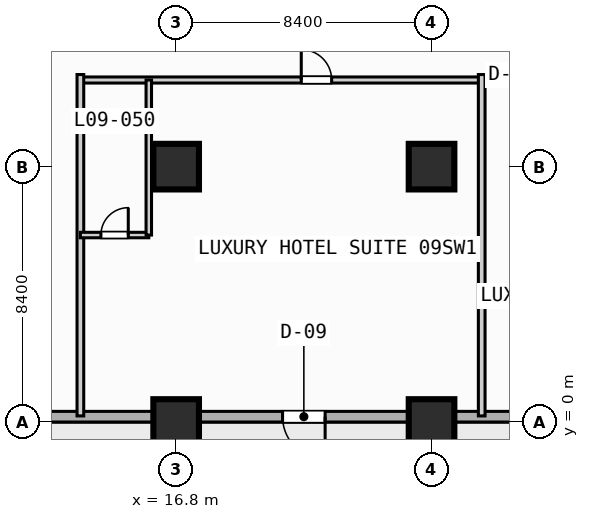
"""IFC4 building model, lengths in metres.
Left out: names, types, materials, properties, quantities, classifications, styles, units other than length and angle.
Written with IfcOpenShell. Run it as: python <this file> out.ifc"""

import sys

from ifc_helpers import new_model, si_unit, direction, frame, frame_2d, origin, origin_2d, place, context, subcontext, project, spatial, rectangle, extrude, element, fill, save


model = new_model("IFC4")
c1 = context("Model", 3, precision=1e-05, world=origin(), true_north=direction((0.0, 1.0)))
c2 = subcontext(c1, "Body", "Model", "MODEL_VIEW")
j1 = project(units=[si_unit("LENGTHUNIT", "METRE"), si_unit("PLANEANGLEUNIT", "RADIAN")], contexts=[c1])
p1 = place(None, origin())
s1 = spatial("IfcSite", under=j1, at=p1, CompositionType="ELEMENT")
p2 = place(p1, origin())
s2 = spatial("IfcBuilding", under=s1, at=p2, CompositionType="ELEMENT")
p3 = place(p2, frame((0.0, 0.0, 43.4)))
s3 = spatial("IfcBuildingStorey", under=s2, at=p3, CompositionType="ELEMENT", Elevation=43.4)
for number, where, z_axis, x_axis in (
    (1, (16.8, 0.0, 0.0), (0.0, 0.0, 1.0), (1.0, 0.0, 0.0)),
    (2, (16.8, 8.4, 0.0), (0.0, 0.0, 1.0), (1.0, 0.0, 0.0)),
    (3, (25.2, 0.0, 0.0), (0.0, 0.0, 1.0), (1.0, 0.0, 0.0)),
    (4, (25.2, 8.4, 0.0), (0.0, 0.0, 1.0), (1.0, 0.0, 0.0)),
):
    element("IfcColumn", number, at=place(p3, frame(where, z_axis=z_axis, x_axis=x_axis)), inside=s3, PredefinedType="COLUMN", context=c2, shape_type="SweptSolid", body=[
        extrude(rectangle(XDim=1.5, YDim=1.5, at=origin_2d()), origin(), (0.0, 0.0, 1.0), 3.8),
    ])
p4 = place(p3, frame((89.225, 0.175, 0.0), z_axis=(0.0, 0.0, 1.0), x_axis=(-1.0, 0.0, 0.0)))
e5 = element("IfcWall", 5, at=p4, inside=s3, PredefinedType="STANDARD", context=c2, shape_type="SweptSolid", body=[
    extrude(rectangle(XDim=86.05, YDim=0.35, at=frame_2d((43.025, 0.0))), origin(), (0.0, 0.0, 1.0), 3.55),
])
p5 = place(p4, frame((67.525, 0.0, 0.0)))
e6 = element("IfcOpeningElement", 6, at=p5, cuts=e5, PredefinedType="OPENING", context=c2, shape_type="SweptSolid", body=[
    extrude(rectangle(XDim=1.4, YDim=2.2, at=frame_2d((0.7, 1.1))), frame((0.0, 0.185, 0.0), z_axis=(0.0, -1.0, 0.0), x_axis=(1.0, 0.0, 0.0)), (0.0, 0.0, 1.0), 0.37),
])
p6 = place(p4, frame((58.725, 0.0, 0.85)))
e7 = element("IfcOpeningElement", 7, at=p6, cuts=e5, PredefinedType="OPENING", context=c2, shape_type="SweptSolid", body=[
    extrude(rectangle(XDim=2.2, YDim=1.8, at=frame_2d((1.1, 0.9))), frame((0.0, 0.185, 0.0), z_axis=(0.0, -1.0, 0.0), x_axis=(1.0, 0.0, 0.0)), (0.0, 0.0, 1.0), 0.37),
])
p7 = place(p4, frame((41.925, 0.0, 0.85)))
e8 = element("IfcOpeningElement", 8, at=p7, cuts=e5, PredefinedType="OPENING", context=c2, shape_type="SweptSolid", body=[
    extrude(rectangle(XDim=2.2, YDim=1.8, at=frame_2d((1.1, 0.9))), frame((0.0, 0.185, 0.0), z_axis=(0.0, -1.0, 0.0), x_axis=(1.0, 0.0, 0.0)), (0.0, 0.0, 1.0), 0.37),
])
p8 = place(p4, frame((33.525, 0.0, 0.85)))
e9 = element("IfcOpeningElement", 9, at=p8, cuts=e5, PredefinedType="OPENING", context=c2, shape_type="SweptSolid", body=[
    extrude(rectangle(XDim=2.2, YDim=1.8, at=frame_2d((1.1, 0.9))), frame((0.0, 0.185, 0.0), z_axis=(0.0, -1.0, 0.0), x_axis=(1.0, 0.0, 0.0)), (0.0, 0.0, 1.0), 0.37),
])
p9 = place(p4, frame((16.725, 0.0, 0.85)))
e10 = element("IfcOpeningElement", 10, at=p9, cuts=e5, PredefinedType="OPENING", context=c2, shape_type="SweptSolid", body=[
    extrude(rectangle(XDim=2.2, YDim=1.8, at=frame_2d((1.1, 0.9))), frame((0.0, 0.185, 0.0), z_axis=(0.0, -1.0, 0.0), x_axis=(1.0, 0.0, 0.0)), (0.0, 0.0, 1.0), 0.37),
])
p10 = place(p4, frame((8.325, 0.0, 0.85)))
e11 = element("IfcOpeningElement", 11, at=p10, cuts=e5, PredefinedType="OPENING", context=c2, shape_type="SweptSolid", body=[
    extrude(rectangle(XDim=2.2, YDim=1.8, at=frame_2d((1.1, 0.9))), frame((0.0, 0.185, 0.0), z_axis=(0.0, -1.0, 0.0), x_axis=(1.0, 0.0, 0.0)), (0.0, 0.0, 1.0), 0.37),
])
p11 = place(p3, frame((13.65, 11.25, 0.0), z_axis=(0.0, 0.0, 1.0), x_axis=(1.0, 0.0, 0.0)))
e12 = element("IfcWall", 12, at=p11, inside=s3, PredefinedType="PARTITIONING", context=c2, shape_type="SweptSolid", body=[
    extrude(rectangle(XDim=75.15, YDim=0.2, at=frame_2d((37.575, 0.0))), origin(), (0.0, 0.0, 1.0), 3.55),
])
p12 = place(p11, frame((7.265, 0.0, 0.0)))
e13 = element("IfcOpeningElement", 13, at=p12, cuts=e12, PredefinedType="OPENING", context=c2, shape_type="SweptSolid", body=[
    extrude(rectangle(XDim=1.0, YDim=2.15, at=frame_2d((0.5, 1.075))), frame((0.0, 0.11, 0.0), z_axis=(0.0, -1.0, 0.0), x_axis=(1.0, 0.0, 0.0)), (0.0, 0.0, 1.0), 0.22),
])
p13 = place(p11, frame((17.135, 0.0, 0.0)))
e14 = element("IfcOpeningElement", 14, at=p13, cuts=e12, PredefinedType="OPENING", context=c2, shape_type="SweptSolid", body=[
    extrude(rectangle(XDim=1.0, YDim=2.15, at=frame_2d((0.5, 1.075))), frame((0.0, 0.11, 0.0), z_axis=(0.0, -1.0, 0.0), x_axis=(1.0, 0.0, 0.0)), (0.0, 0.0, 1.0), 0.22),
])
p14 = place(p11, frame((31.665, 0.0, 0.0)))
e15 = element("IfcOpeningElement", 15, at=p14, cuts=e12, PredefinedType="OPENING", context=c2, shape_type="SweptSolid", body=[
    extrude(rectangle(XDim=1.0, YDim=2.15, at=frame_2d((0.5, 1.075))), frame((0.0, 0.11, 0.0), z_axis=(0.0, -1.0, 0.0), x_axis=(1.0, 0.0, 0.0)), (0.0, 0.0, 1.0), 0.22),
])
p15 = place(p11, frame((41.535, 0.0, 0.0)))
e16 = element("IfcOpeningElement", 16, at=p15, cuts=e12, PredefinedType="OPENING", context=c2, shape_type="SweptSolid", body=[
    extrude(rectangle(XDim=1.0, YDim=2.15, at=frame_2d((0.5, 1.075))), frame((0.0, 0.11, 0.0), z_axis=(0.0, -1.0, 0.0), x_axis=(1.0, 0.0, 0.0)), (0.0, 0.0, 1.0), 0.22),
])
p16 = place(p11, frame((56.065, 0.0, 0.0)))
e17 = element("IfcOpeningElement", 17, at=p16, cuts=e12, PredefinedType="OPENING", context=c2, shape_type="SweptSolid", body=[
    extrude(rectangle(XDim=1.0, YDim=2.15, at=frame_2d((0.5, 1.075))), frame((0.0, 0.11, 0.0), z_axis=(0.0, -1.0, 0.0), x_axis=(1.0, 0.0, 0.0)), (0.0, 0.0, 1.0), 0.22),
])
p17 = place(p11, frame((66.91, 0.0, 0.0)))
e18 = element("IfcOpeningElement", 18, at=p17, cuts=e12, PredefinedType="OPENING", context=c2, shape_type="SweptSolid", body=[
    extrude(rectangle(XDim=1.0, YDim=2.15, at=frame_2d((0.5, 1.075))), frame((0.0, 0.11, 0.0), z_axis=(0.0, -1.0, 0.0), x_axis=(1.0, 0.0, 0.0)), (0.0, 0.0, 1.0), 0.22),
])
p18 = place(p3, frame((13.65, 0.2, 0.0), z_axis=(0.0, 0.0, 1.0), x_axis=(0.0, 1.0, 0.0)))
e19 = element("IfcWall", 19, at=p18, inside=s3, PredefinedType="PARTITIONING", context=c2, shape_type="SweptSolid", body=[
    extrude(rectangle(XDim=11.23, YDim=0.22, at=frame_2d((5.615, 0.0))), origin(), (0.0, 0.0, 1.0), 3.55),
])
p19 = place(p3, frame((13.65, 6.15, 0.0), z_axis=(0.0, 0.0, 1.0), x_axis=(1.0, 0.0, 0.0)))
e20 = element("IfcWall", 20, at=p19, inside=s3, PredefinedType="PLUMBINGWALL", context=c2, shape_type="SweptSolid", body=[
    extrude(rectangle(XDim=2.25, YDim=0.18, at=frame_2d((1.125, 0.0))), origin(), (0.0, 0.0, 1.0), 3.55),
])
p20 = place(p19, frame((0.675, 0.0, 0.0)))
e21 = element("IfcOpeningElement", 21, at=p20, cuts=e20, PredefinedType="OPENING", context=c2, shape_type="SweptSolid", body=[
    extrude(rectangle(XDim=0.9, YDim=2.1, at=frame_2d((0.45, 1.05))), frame((0.0, 0.1, 0.0), z_axis=(0.0, -1.0, 0.0), x_axis=(1.0, 0.0, 0.0)), (0.0, 0.0, 1.0), 0.2),
])
p21 = place(p3, frame((15.9, 6.15, 0.0), z_axis=(0.0, 0.0, 1.0), x_axis=(0.0, 1.0, 0.0)))
e22 = element("IfcWall", 22, at=p21, inside=s3, PredefinedType="PLUMBINGWALL", context=c2, shape_type="SweptSolid", body=[
    extrude(rectangle(XDim=5.1, YDim=0.18, at=frame_2d((2.55, 0.0))), origin(), (0.0, 0.0, 1.0), 3.55),
])
p22 = place(p3, frame((26.85, 0.2, 0.0), z_axis=(0.0, 0.0, 1.0), x_axis=(0.0, 1.0, 0.0)))
e23 = element("IfcWall", 23, at=p22, inside=s3, PredefinedType="PARTITIONING", context=c2, shape_type="SweptSolid", body=[
    extrude(rectangle(XDim=11.23, YDim=0.22, at=frame_2d((5.615, 0.0))), origin(), (0.0, 0.0, 1.0), 3.55),
])
p23 = place(p5, origin())
e24 = element("IfcDoor", 24, at=p23, inside=s3, OperationType="SINGLE_SWING_LEFT", PredefinedType="DOOR", context=c2, shape_type="SweptSolid", body=[
    extrude(rectangle(XDim=1.4, YDim=2.2, at=frame_2d((0.7, 1.1))), frame((0.0, 0.025, 0.0), z_axis=(0.0, -1.0, 0.0), x_axis=(1.0, 0.0, 0.0)), (0.0, 0.0, 1.0), 0.05),
])
fill(e6, e24)
p24 = place(p12, origin())
e25 = element("IfcDoor", 25, at=p24, inside=s3, OperationType="SINGLE_SWING_LEFT", PredefinedType="DOOR", context=c2, shape_type="SweptSolid", body=[
    extrude(rectangle(XDim=1.0, YDim=2.15, at=frame_2d((0.5, 1.075))), frame((0.0, 0.025, 0.0), z_axis=(0.0, -1.0, 0.0), x_axis=(1.0, 0.0, 0.0)), (0.0, 0.0, 1.0), 0.05),
])
fill(e13, e25)
p25 = place(p20, origin())
e26 = element("IfcDoor", 26, at=p25, inside=s3, OperationType="SINGLE_SWING_RIGHT", PredefinedType="DOOR", context=c2, shape_type="SweptSolid", body=[
    extrude(rectangle(XDim=0.9, YDim=2.1, at=frame_2d((0.45, 1.05))), frame((0.0, 0.025, 0.0), z_axis=(0.0, -1.0, 0.0), x_axis=(1.0, 0.0, 0.0)), (0.0, 0.0, 1.0), 0.05),
])
fill(e21, e26)
save(model, sys.argv[1])
